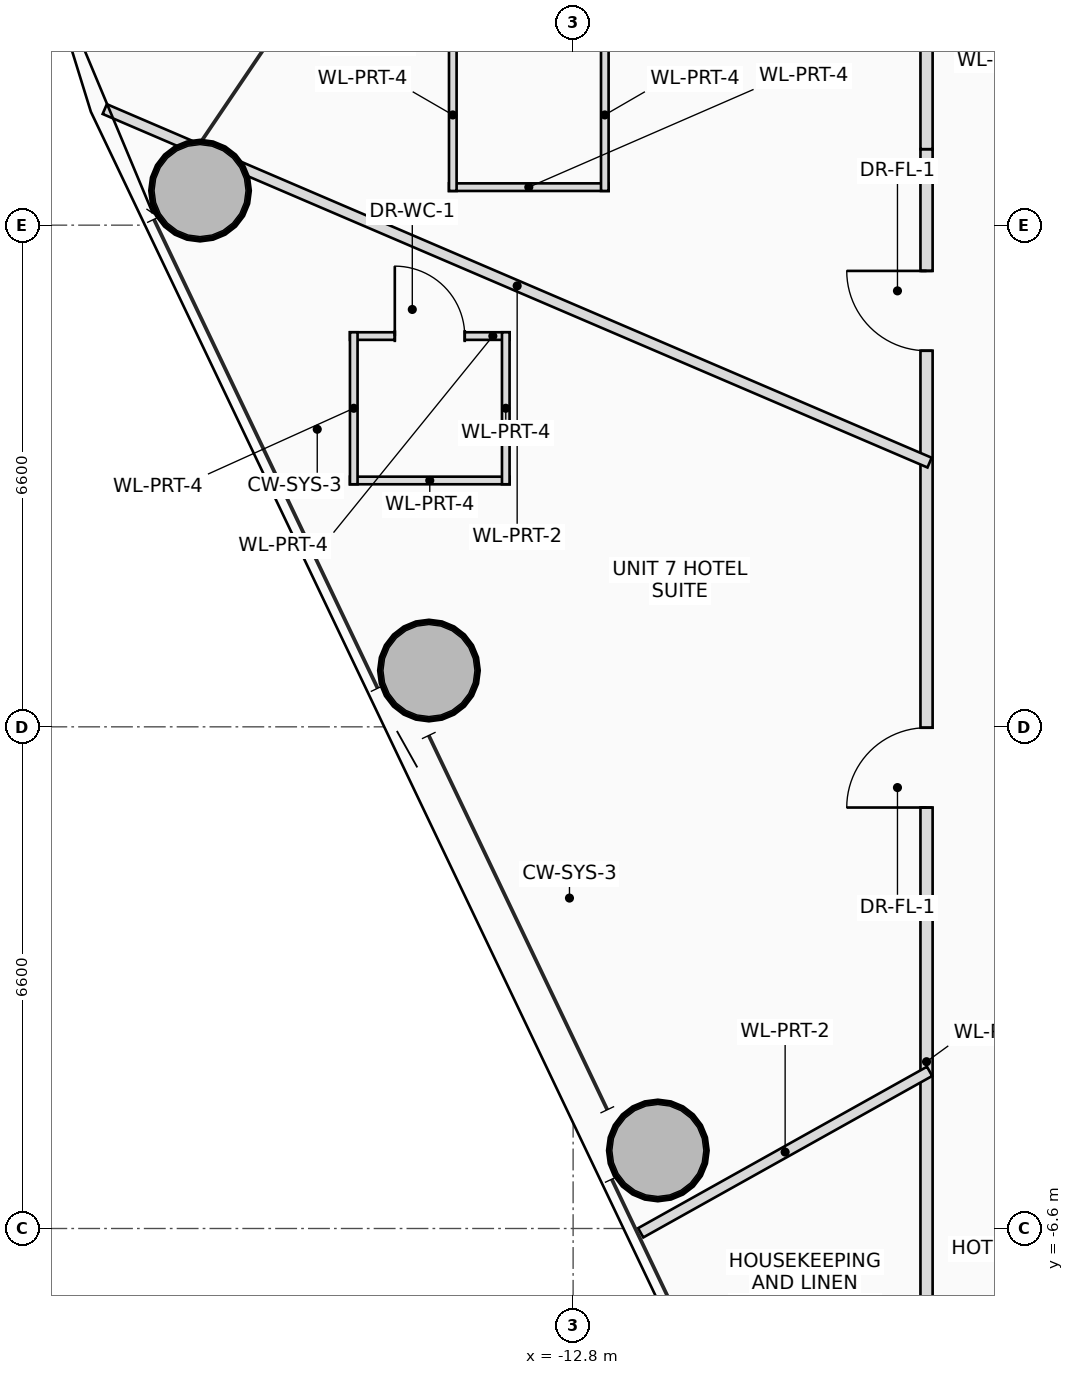
"""IFC4 building model, lengths in metres.
Left out: names, types, materials, properties, quantities, classifications, styles, units other than length and angle.
Written with IfcOpenShell. Run it as: python <this file> out.ifc"""

import sys

from ifc_helpers import new_model, si_unit, direction, frame, frame_2d, origin, origin_2d, place, context, subcontext, project, spatial, rectangle, hollow_circle, extrude, source, transform, mapped, element, fill, save


model = new_model("IFC4")
c1 = context("Model", 3, precision=1e-05, world=origin(), true_north=direction((0.0, 1.0)))
c2 = subcontext(c1, "Body", "Model", "MODEL_VIEW")
j1 = project(units=[si_unit("LENGTHUNIT", "METRE"), si_unit("PLANEANGLEUNIT", "RADIAN")], contexts=[c1])
p1 = place(None, origin())
s1 = spatial("IfcSite", under=j1, at=p1, CompositionType="ELEMENT")
p2 = place(p1, origin())
s2 = spatial("IfcBuilding", under=s1, at=p2, CompositionType="ELEMENT")
p3 = place(p2, frame((0.0, 0.0, 139.85)))
s3 = spatial("IfcBuildingStorey", under=s2, at=p3, CompositionType="ELEMENT", Elevation=139.85)
m1 = source(origin(), c2, "Body", "SweptSolid", [
    extrude(hollow_circle(Radius=0.65, WallThickness=0.045, at=origin_2d()), origin(), (0.0, 0.0, 1.0), 3.45),
])
for number, where, z_axis, x_axis in (
    (1, (-17.708, 7.055, 0.0), (0.0, 0.0, 1.0), (1.0, 0.0, 0.0)),
    (2, (-14.697, 0.74, 0.0), (0.0, 0.0, 1.0), (1.0, 0.0, 0.0)),
    (3, (-11.685, -5.573, 0.0), (0.0, 0.0, 1.0), (1.0, 0.0, 0.0)),
):
    element("IfcColumn", number, at=place(p3, frame(where, z_axis=z_axis, x_axis=x_axis)), inside=s3, PredefinedType="COLUMN", context=c2, shape_type="MappedRepresentation", body=[
        mapped(m1, transform((0.0, 0.0, 0.0), scale=1.0)),
    ])
p4 = place(p3, frame((-12.333, 7.1, 0.0), z_axis=(0.0, 0.0, 1.0), x_axis=(-1.0, 0.0, 0.0)))
e4 = element("IfcWall", 4, at=p4, inside=s3, PredefinedType="PARTITIONING", context=c2, shape_type="SweptSolid", body=[
    extrude(rectangle(XDim=2.1, YDim=0.1, at=frame_2d((1.05, 0.0))), origin(), (0.0, 0.0, 1.0), 2.905),
])
p5 = place(p3, frame((-12.383, 9.05, 0.0), z_axis=(0.0, 0.0, 1.0), x_axis=(0.0, -1.0, 0.0)))
e5 = element("IfcWall", 5, at=p5, inside=s3, PredefinedType="PARTITIONING", context=c2, shape_type="SweptSolid", body=[
    extrude(rectangle(XDim=2.0, YDim=0.1, at=frame_2d((1.0, 0.0))), origin(), (0.0, 0.0, 1.0), 2.905),
])
p6 = place(p3, frame((-14.383, 7.05, 0.0), z_axis=(0.0, 0.0, 1.0), x_axis=(0.0, 1.0, 0.0)))
e6 = element("IfcWall", 6, at=p6, inside=s3, PredefinedType="PARTITIONING", context=c2, shape_type="SweptSolid", body=[
    extrude(rectangle(XDim=2.0, YDim=0.1, at=frame_2d((1.0, 0.0))), origin(), (0.0, 0.0, 1.0), 3.25),
])
p7 = place(p3, frame((-15.736, 5.141, 0.0), z_axis=(0.0, 0.0, 1.0), x_axis=(1.0, 0.0, 0.0)))
e7 = element("IfcWall", 7, at=p7, inside=s3, PredefinedType="PARTITIONING", context=c2, shape_type="SweptSolid", body=[
    extrude(rectangle(XDim=2.1, YDim=0.1, at=frame_2d((1.05, 0.0))), origin(), (0.0, 0.0, 1.0), 2.905),
])
p8 = place(p7, frame((0.59, 0.0, 0.0)))
e8 = element("IfcOpeningElement", 8, at=p8, cuts=e7, PredefinedType="OPENING", context=c2, shape_type="SweptSolid", body=[
    extrude(rectangle(XDim=0.92, YDim=2.1, at=frame_2d((0.46, 1.05))), frame((0.0, 0.06, 0.0), z_axis=(0.0, -1.0, 0.0), x_axis=(1.0, 0.0, 0.0)), (0.0, 0.0, 1.0), 0.12),
])
p9 = place(p3, frame((-13.636, 3.241, 0.0), z_axis=(0.0, 0.0, 1.0), x_axis=(-1.0, 0.0, 0.0)))
e9 = element("IfcWall", 9, at=p9, inside=s3, PredefinedType="PARTITIONING", context=c2, shape_type="SweptSolid", body=[
    extrude(rectangle(XDim=2.1, YDim=0.1, at=frame_2d((1.05, 0.0))), origin(), (0.0, 0.0, 1.0), 3.25),
])
p10 = place(p3, frame((-13.686, 5.191, 0.0), z_axis=(0.0, 0.0, 1.0), x_axis=(0.0, -1.0, 0.0)))
e10 = element("IfcWall", 10, at=p10, inside=s3, PredefinedType="PARTITIONING", context=c2, shape_type="SweptSolid", body=[
    extrude(rectangle(XDim=2.0, YDim=0.1, at=frame_2d((1.0, 0.0))), origin(), (0.0, 0.0, 1.0), 2.905),
])
p11 = place(p3, frame((-15.686, 3.191, 0.0), z_axis=(0.0, 0.0, 1.0), x_axis=(0.0, 1.0, 0.0)))
e11 = element("IfcWall", 11, at=p11, inside=s3, PredefinedType="PARTITIONING", context=c2, shape_type="SweptSolid", body=[
    extrude(rectangle(XDim=2.0, YDim=0.1, at=frame_2d((1.0, 0.0))), origin(), (0.0, 0.0, 1.0), 3.25),
])
p12 = place(p3, frame((-8.15, -7.6, 0.0), z_axis=(0.0, 0.0, 1.0), x_axis=(0.0, 1.0, 0.0)))
e12 = element("IfcWall", 12, at=p12, inside=s3, PredefinedType="PARTITIONING", context=c2, shape_type="SweptSolid", body=[
    extrude(rectangle(XDim=15.2, YDim=0.16, at=frame_2d((7.6, 0.0))), origin(), (0.0, 0.0, 1.0), 2.605),
])
p13 = place(p12, frame((6.538, 0.0, 0.0)))
e13 = element("IfcOpeningElement", 13, at=p13, cuts=e12, PredefinedType="OPENING", context=c2, shape_type="SweptSolid", body=[
    extrude(rectangle(XDim=1.05, YDim=2.2, at=frame_2d((0.525, 1.1))), frame((0.0, 0.09, 0.0), z_axis=(0.0, -1.0, 0.0), x_axis=(1.0, 0.0, 0.0)), (0.0, 0.0, 1.0), 0.18),
])
p14 = place(p12, frame((12.548, 0.0, 0.0)))
e14 = element("IfcOpeningElement", 14, at=p14, cuts=e12, PredefinedType="OPENING", context=c2, shape_type="SweptSolid", body=[
    extrude(rectangle(XDim=1.05, YDim=2.2, at=frame_2d((0.525, 1.1))), frame((0.0, 0.09, 0.0), z_axis=(0.0, -1.0, 0.0), x_axis=(1.0, 0.0, 0.0)), (0.0, 0.0, 1.0), 0.18),
])
p15 = place(p3, frame((-8.15, 7.6, 0.0), z_axis=(0.0, 0.0, 1.0), x_axis=(0.0, 1.0, 0.0)))
e15 = element("IfcWall", 15, at=p15, inside=s3, PredefinedType="PARTITIONING", context=c2, shape_type="SweptSolid", body=[
    extrude(rectangle(XDim=2.363, YDim=0.16, at=frame_2d((1.181, 0.0))), origin(), (0.0, 0.0, 1.0), 2.805),
])
p16 = place(p3, frame((-8.11, 3.476, 0.0), z_axis=(0.0, 0.0, 1.0), x_axis=(-0.919140751836, 0.393929280854, 0.0)))
e16 = element("IfcWall", 16, at=p16, inside=s3, PredefinedType="PARTITIONING", context=c2, shape_type="SweptSolid", body=[
    extrude(rectangle(XDim=11.807, YDim=0.14, at=frame_2d((5.903, 0.0))), origin(), (0.0, 0.0, 1.0), 2.605),
])
p17 = place(p3, frame((-8.11, -4.532, 0.0), z_axis=(0.0, 0.0, 1.0), x_axis=(-0.87291398503, -0.487874138216, 0.0)))
e17 = element("IfcWall", 17, at=p17, inside=s3, PredefinedType="PARTITIONING", context=c2, shape_type="SweptSolid", body=[
    extrude(rectangle(XDim=4.354, YDim=0.14, at=frame_2d((2.177, 0.0))), origin(), (0.0, 0.0, 1.0), 2.605),
])
p18 = place(p8, origin())
e18 = element("IfcDoor", 18, at=p18, inside=s3, OperationType="SINGLE_SWING_LEFT", PredefinedType="DOOR", context=c2, shape_type="SweptSolid", body=[
    extrude(rectangle(XDim=0.92, YDim=2.1, at=frame_2d((0.46, 1.05))), frame((0.0, 0.025, 0.0), z_axis=(0.0, -1.0, 0.0), x_axis=(1.0, 0.0, 0.0)), (0.0, 0.0, 1.0), 0.05),
])
fill(e8, e18)
p19 = place(p13, origin())
e19 = element("IfcDoor", 19, at=p19, inside=s3, OperationType="SINGLE_SWING_LEFT", PredefinedType="DOOR", context=c2, shape_type="SweptSolid", body=[
    extrude(rectangle(XDim=1.05, YDim=2.2, at=frame_2d((0.525, 1.1))), frame((0.0, 0.025, 0.0), z_axis=(0.0, -1.0, 0.0), x_axis=(1.0, 0.0, 0.0)), (0.0, 0.0, 1.0), 0.05),
])
fill(e13, e19)
p20 = place(p14, origin())
e20 = element("IfcDoor", 20, at=p20, inside=s3, OperationType="SINGLE_SWING_RIGHT", PredefinedType="DOOR", context=c2, shape_type="SweptSolid", body=[
    extrude(rectangle(XDim=1.05, YDim=2.2, at=frame_2d((0.525, 1.1))), frame((0.0, 0.025, 0.0), z_axis=(0.0, -1.0, 0.0), x_axis=(1.0, 0.0, 0.0)), (0.0, 0.0, 1.0), 0.05),
])
fill(e14, e20)
save(model, sys.argv[1])
